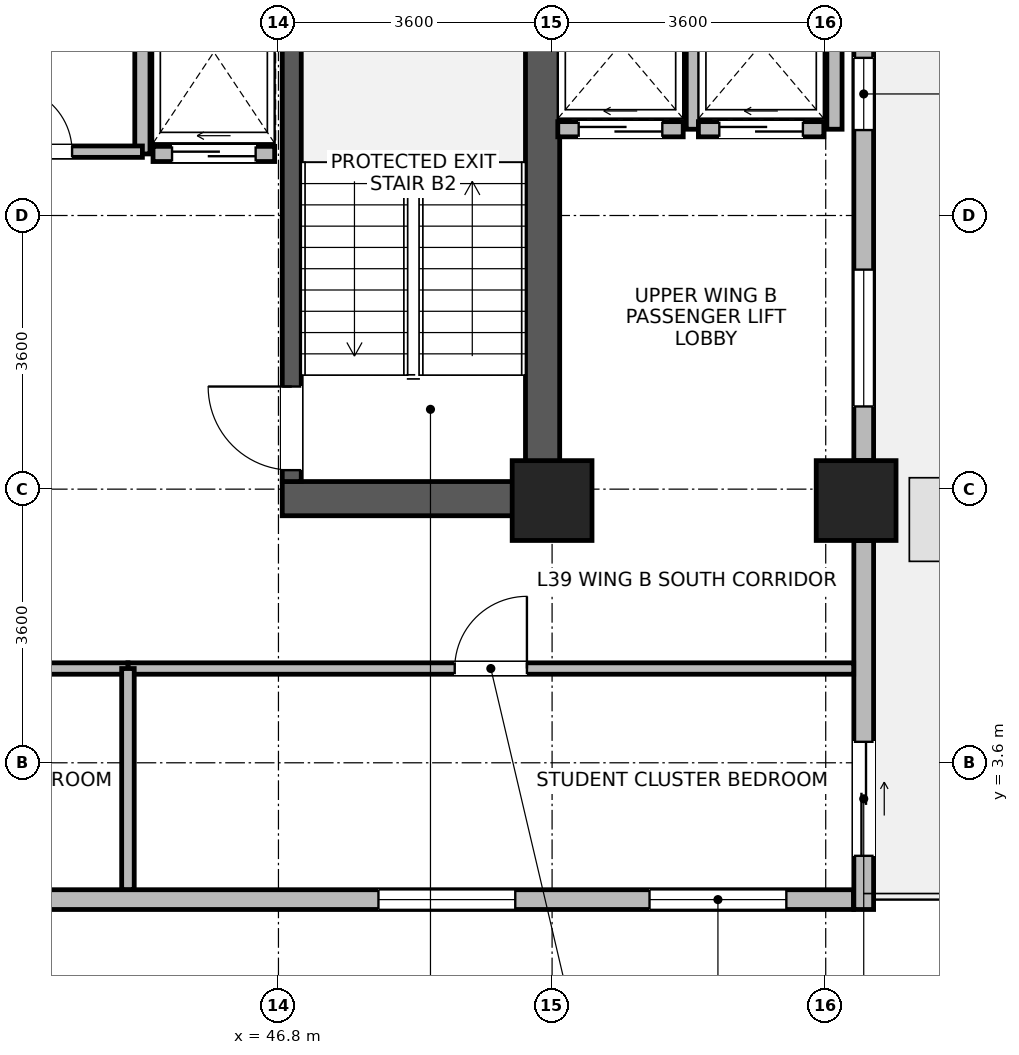
"""IFC4 building model, lengths in metres.
Left out: names, types, materials, properties, quantities, classifications, styles, units other than length and angle.
Written with IfcOpenShell. Run it as: python <this file> out.ifc"""

import sys

from ifc_helpers import new_model, si_unit, direction, frame, frame_2d, origin, origin_2d, place, context, subcontext, project, spatial, rectangle, extrude, source, transform, mapped, element, fill, save


model = new_model("IFC4")
c1 = context("Model", 3, precision=1e-05, world=origin(), true_north=direction((0.0, 1.0)))
c2 = subcontext(c1, "Body", "Model", "MODEL_VIEW")
j1 = project(units=[si_unit("LENGTHUNIT", "METRE"), si_unit("PLANEANGLEUNIT", "RADIAN")], contexts=[c1])
p1 = place(None, origin())
s1 = spatial("IfcSite", under=j1, at=p1, CompositionType="ELEMENT")
p2 = place(p1, origin())
s2 = spatial("IfcBuilding", under=s1, at=p2, CompositionType="ELEMENT")
p3 = place(p2, frame((0.0, 0.0, 155.0)))
s3 = spatial("IfcBuildingStorey", under=s2, at=p3, CompositionType="ELEMENT", Elevation=155.0)
p4 = place(p3, frame((50.275, 6.85, 0.0), z_axis=(0.0, 0.0, 1.0), x_axis=(0.0, 1.0, 0.0)))
e1 = element("IfcWall", 1, at=p4, inside=s3, PredefinedType="SHEAR", context=c2, shape_type="SweptSolid", body=[
    extrude(rectangle(XDim=7.9, YDim=0.45, at=frame_2d((3.95, 0.0))), origin(), (0.0, 0.0, 1.0), 3.46),
])
p5 = place(p3, frame((46.85, 7.075, 0.0), z_axis=(0.0, 0.0, 1.0), x_axis=(1.0, 0.0, 0.0)))
e2 = element("IfcWall", 2, at=p5, inside=s3, PredefinedType="SHEAR", context=c2, shape_type="SweptSolid", body=[
    extrude(rectangle(XDim=3.2, YDim=0.45, at=frame_2d((1.6, 0.0))), origin(), (0.0, 0.0, 1.0), 3.46),
])
p6 = place(p3, frame((46.975, 7.3, 0.0), z_axis=(0.0, 0.0, 1.0), x_axis=(0.0, 1.0, 0.0)))
e3 = element("IfcWall", 3, at=p6, inside=s3, PredefinedType="SHEAR", context=c2, shape_type="SweptSolid", body=[
    extrude(rectangle(XDim=7.0, YDim=0.25, at=frame_2d((3.5, 0.0))), origin(), (0.0, 0.0, 1.0), 3.46),
])
p7 = place(p6, frame((0.15, 0.0, 0.0)))
e4 = element("IfcOpeningElement", 4, at=p7, cuts=e3, PredefinedType="OPENING", context=c2, shape_type="SweptSolid", body=[
    extrude(rectangle(XDim=1.1, YDim=2.08, at=frame_2d((0.55, 1.04))), frame((0.0, 0.135, 0.0), z_axis=(0.0, -1.0, 0.0), x_axis=(1.0, 0.0, 0.0)), (0.0, 0.0, 1.0), 0.27),
])
m1 = source(origin(), c2, "Body", "SweptSolid", [
    extrude(rectangle(XDim=1.05, YDim=1.05, at=origin_2d()), origin(), (0.0, 0.0, 1.0), 3.7),
])
for number, where, z_axis, x_axis in (
    (5, (50.4, 7.05, 0.0), (0.0, 0.0, 1.0), (1.0, 0.0, 0.0)),
    (6, (54.4, 7.05, 0.0), (0.0, 0.0, 1.0), (1.0, 0.0, 0.0)),
):
    element("IfcColumn", number, at=place(p3, frame(where, z_axis=z_axis, x_axis=x_axis)), inside=s3, PredefinedType="COLUMN", context=c2, shape_type="MappedRepresentation", body=[
        mapped(m1, transform((0.0, 0.0, 0.0), x_axis=(1.0, 0.0, 0.0), y_axis=(0.0, 1.0, 0.0), z_axis=(0.0, 0.0, 1.0), scale=1.0)),
    ])
p8 = place(p3, frame((54.365, 1.8, 0.0), z_axis=(0.0, 0.0, 1.0), x_axis=(-1.0, 0.0, 0.0)))
e7 = element("IfcWall", 7, at=p8, inside=s3, PredefinedType="STANDARD", context=c2, shape_type="SweptSolid", body=[
    extrude(rectangle(XDim=28.53, YDim=0.26, at=frame_2d((14.265, 0.0))), origin(), (0.0, 0.0, 1.0), 3.44),
])
p9 = place(p8, frame((0.883, 0.0, 0.85)))
e8 = element("IfcOpeningElement", 8, at=p9, cuts=e7, PredefinedType="OPENING", context=c2, shape_type="SweptSolid", body=[
    extrude(rectangle(XDim=1.8, YDim=1.85, at=frame_2d((0.9, 0.925))), frame((0.0, 0.14, 0.0), z_axis=(0.0, -1.0, 0.0), x_axis=(1.0, 0.0, 0.0)), (0.0, 0.0, 1.0), 0.28),
])
p10 = place(p8, frame((4.449, 0.0, 0.85)))
e9 = element("IfcOpeningElement", 9, at=p10, cuts=e7, PredefinedType="OPENING", context=c2, shape_type="SweptSolid", body=[
    extrude(rectangle(XDim=1.8, YDim=1.85, at=frame_2d((0.9, 0.925))), frame((0.0, 0.14, 0.0), z_axis=(0.0, -1.0, 0.0), x_axis=(1.0, 0.0, 0.0)), (0.0, 0.0, 1.0), 0.28),
])
p11 = place(p8, frame((11.582, 0.0, 0.85)))
e10 = element("IfcOpeningElement", 10, at=p11, cuts=e7, PredefinedType="OPENING", context=c2, shape_type="SweptSolid", body=[
    extrude(rectangle(XDim=1.8, YDim=1.85, at=frame_2d((0.9, 0.925))), frame((0.0, 0.14, 0.0), z_axis=(0.0, -1.0, 0.0), x_axis=(1.0, 0.0, 0.0)), (0.0, 0.0, 1.0), 0.28),
])
p12 = place(p8, frame((15.148, 0.0, 0.85)))
e11 = element("IfcOpeningElement", 11, at=p12, cuts=e7, PredefinedType="OPENING", context=c2, shape_type="SweptSolid", body=[
    extrude(rectangle(XDim=1.8, YDim=1.85, at=frame_2d((0.9, 0.925))), frame((0.0, 0.14, 0.0), z_axis=(0.0, -1.0, 0.0), x_axis=(1.0, 0.0, 0.0)), (0.0, 0.0, 1.0), 0.28),
])
p13 = place(p8, frame((22.281, 0.0, 0.85)))
e12 = element("IfcOpeningElement", 12, at=p13, cuts=e7, PredefinedType="OPENING", context=c2, shape_type="SweptSolid", body=[
    extrude(rectangle(XDim=1.8, YDim=1.85, at=frame_2d((0.9, 0.925))), frame((0.0, 0.14, 0.0), z_axis=(0.0, -1.0, 0.0), x_axis=(1.0, 0.0, 0.0)), (0.0, 0.0, 1.0), 0.28),
])
p14 = place(p8, frame((25.847, 0.0, 0.85)))
e13 = element("IfcOpeningElement", 13, at=p14, cuts=e7, PredefinedType="OPENING", context=c2, shape_type="SweptSolid", body=[
    extrude(rectangle(XDim=1.8, YDim=1.85, at=frame_2d((0.9, 0.925))), frame((0.0, 0.14, 0.0), z_axis=(0.0, -1.0, 0.0), x_axis=(1.0, 0.0, 0.0)), (0.0, 0.0, 1.0), 0.28),
])
p15 = place(p3, frame((54.5, 6.524, 0.0), z_axis=(0.0, 0.0, 1.0), x_axis=(0.0, -1.0, 0.0)))
e14 = element("IfcWall", 14, at=p15, inside=s3, PredefinedType="STANDARD", context=c2, shape_type="SweptSolid", body=[
    extrude(rectangle(XDim=4.854, YDim=0.26, at=frame_2d((2.427, 0.0))), origin(), (0.0, 0.0, 1.0), 3.44),
])
p16 = place(p15, frame((2.648, 0.0, 0.0)))
e15 = element("IfcOpeningElement", 15, at=p16, cuts=e14, PredefinedType="OPENING", context=c2, shape_type="SweptSolid", body=[
    extrude(rectangle(XDim=1.5, YDim=2.15, at=frame_2d((0.75, 1.075))), frame((0.0, 0.14, 0.0), z_axis=(0.0, -1.0, 0.0), x_axis=(1.0, 0.0, 0.0)), (0.0, 0.0, 1.0), 0.28),
])
p17 = place(p3, frame((54.5, 14.024, 0.0), z_axis=(0.0, 0.0, 1.0), x_axis=(0.0, -1.0, 0.0)))
e16 = element("IfcWall", 16, at=p17, inside=s3, PredefinedType="STANDARD", context=c2, shape_type="SweptSolid", body=[
    extrude(rectangle(XDim=6.448, YDim=0.26, at=frame_2d((3.224, 0.0))), origin(), (0.0, 0.0, 1.0), 2.99),
])
p18 = place(p17, frame((3.936, 0.0, 0.85)))
e17 = element("IfcOpeningElement", 17, at=p18, cuts=e16, PredefinedType="OPENING", context=c2, shape_type="SweptSolid", body=[
    extrude(rectangle(XDim=1.8, YDim=1.85, at=frame_2d((0.9, 0.925))), frame((0.0, 0.14, 0.0), z_axis=(0.0, -1.0, 0.0), x_axis=(1.0, 0.0, 0.0)), (0.0, 0.0, 1.0), 0.28),
])
p19 = place(p17, frame((1.15, 0.0, 0.85)))
e18 = element("IfcOpeningElement", 18, at=p19, cuts=e16, PredefinedType="OPENING", context=c2, shape_type="SweptSolid", body=[
    extrude(rectangle(XDim=0.95, YDim=1.75, at=frame_2d((0.475, 0.875))), frame((0.0, 0.14, 0.0), z_axis=(0.0, -1.0, 0.0), x_axis=(1.0, 0.0, 0.0)), (0.0, 0.0, 1.0), 0.28),
])
p20 = place(p3, frame((50.475, 11.935, 0.0), z_axis=(0.0, 0.0, 1.0), x_axis=(1.0, 0.0, 0.0)))
e19 = element("IfcWall", 19, at=p20, inside=s3, PredefinedType="PARTITIONING", context=c2, shape_type="SweptSolid", body=[
    extrude(rectangle(XDim=1.65, YDim=0.2, at=frame_2d((0.825, 0.0))), origin(), (0.0, 0.0, 1.0), 3.44),
])
p21 = place(p20, frame((0.275, 0.0, 0.0)))
e20 = element("IfcOpeningElement", 20, at=p21, cuts=e19, PredefinedType="OPENING", context=c2, shape_type="SweptSolid", body=[
    extrude(rectangle(XDim=1.1, YDim=2.12, at=frame_2d((0.55, 1.06))), frame((0.0, 0.11, 0.0), z_axis=(0.0, -1.0, 0.0), x_axis=(1.0, 0.0, 0.0)), (0.0, 0.0, 1.0), 0.22),
])
p22 = place(p3, frame((52.265, 11.935, 0.0), z_axis=(0.0, 0.0, 1.0), x_axis=(0.0, 1.0, 0.0)))
e21 = element("IfcWall", 21, at=p22, inside=s3, PredefinedType="PARTITIONING", context=c2, shape_type="SweptSolid", body=[
    extrude(rectangle(XDim=2.23, YDim=0.2, at=frame_2d((1.115, 0.0))), origin(), (0.0, 0.0, 1.0), 3.44),
])
p23 = place(p3, frame((52.325, 11.935, 0.0), z_axis=(0.0, 0.0, 1.0), x_axis=(1.0, 0.0, 0.0)))
e22 = element("IfcWall", 22, at=p23, inside=s3, PredefinedType="PARTITIONING", context=c2, shape_type="SweptSolid", body=[
    extrude(rectangle(XDim=1.65, YDim=0.2, at=frame_2d((0.825, 0.0))), origin(), (0.0, 0.0, 1.0), 3.44),
])
p24 = place(p23, frame((0.275, 0.0, 0.0)))
e23 = element("IfcOpeningElement", 23, at=p24, cuts=e22, PredefinedType="OPENING", context=c2, shape_type="SweptSolid", body=[
    extrude(rectangle(XDim=1.1, YDim=2.12, at=frame_2d((0.55, 1.06))), frame((0.0, 0.11, 0.0), z_axis=(0.0, -1.0, 0.0), x_axis=(1.0, 0.0, 0.0)), (0.0, 0.0, 1.0), 0.22),
])
p25 = place(p3, frame((54.115, 11.935, 0.0), z_axis=(0.0, 0.0, 1.0), x_axis=(0.0, 1.0, 0.0)))
e24 = element("IfcWall", 24, at=p25, inside=s3, PredefinedType="PARTITIONING", context=c2, shape_type="SweptSolid", body=[
    extrude(rectangle(XDim=2.23, YDim=0.2, at=frame_2d((1.115, 0.0))), origin(), (0.0, 0.0, 1.0), 2.99),
])
p26 = place(p3, frame((45.15, 11.61, 0.0), z_axis=(0.0, 0.0, 1.0), x_axis=(1.0, 0.0, 0.0)))
e25 = element("IfcWall", 25, at=p26, inside=s3, PredefinedType="PARTITIONING", context=c2, shape_type="SweptSolid", body=[
    extrude(rectangle(XDim=1.6, YDim=0.2, at=frame_2d((0.8, 0.0))), origin(), (0.0, 0.0, 1.0), 3.44),
])
p27 = place(p26, frame((0.25, 0.0, 0.0)))
e26 = element("IfcOpeningElement", 26, at=p27, cuts=e25, PredefinedType="OPENING", context=c2, shape_type="SweptSolid", body=[
    extrude(rectangle(XDim=1.1, YDim=2.12, at=frame_2d((0.55, 1.06))), frame((0.0, 0.11, 0.0), z_axis=(0.0, -1.0, 0.0), x_axis=(1.0, 0.0, 0.0)), (0.0, 0.0, 1.0), 0.22),
])
p28 = place(p3, frame((45.01, 11.61, 0.0), z_axis=(0.0, 0.0, 1.0), x_axis=(0.0, 1.0, 0.0)))
e27 = element("IfcWall", 27, at=p28, inside=s3, PredefinedType="PARTITIONING", context=c2, shape_type="SweptSolid", body=[
    extrude(rectangle(XDim=2.68, YDim=0.2, at=frame_2d((1.34, 0.0))), origin(), (0.0, 0.0, 1.0), 3.44),
])
p29 = place(p3, frame((44.82, 4.84, 0.0), z_axis=(0.0, 0.0, 1.0), x_axis=(1.0, 0.0, 0.0)))
e28 = element("IfcWall", 28, at=p29, inside=s3, PredefinedType="PARTITIONING", context=c2, shape_type="SweptSolid", body=[
    extrude(rectangle(XDim=9.548, YDim=0.15, at=frame_2d((4.774, 0.0))), origin(), (0.0, 0.0, 1.0), 3.44),
])
p30 = place(p29, frame((4.299, 0.0, 0.0)))
e29 = element("IfcOpeningElement", 29, at=p30, cuts=e28, PredefinedType="OPENING", context=c2, shape_type="SweptSolid", body=[
    extrude(rectangle(XDim=0.95, YDim=2.1, at=frame_2d((0.475, 1.05))), frame((0.0, 0.085, 0.0), z_axis=(0.0, -1.0, 0.0), x_axis=(1.0, 0.0, 0.0)), (0.0, 0.0, 1.0), 0.17),
])
p31 = place(p3, frame((35.64, 4.84, 0.0), z_axis=(0.0, 0.0, 1.0), x_axis=(1.0, 0.0, 0.0)))
e30 = element("IfcWall", 30, at=p31, inside=s3, PredefinedType="PARTITIONING", context=c2, shape_type="SweptSolid", body=[
    extrude(rectangle(XDim=9.18, YDim=0.15, at=frame_2d((4.59, 0.0))), origin(), (0.0, 0.0, 1.0), 3.44),
])
p32 = place(p31, frame((4.115, 0.0, 0.0)))
e31 = element("IfcOpeningElement", 31, at=p32, cuts=e30, PredefinedType="OPENING", context=c2, shape_type="SweptSolid", body=[
    extrude(rectangle(XDim=0.95, YDim=2.1, at=frame_2d((0.475, 1.05))), frame((0.0, 0.085, 0.0), z_axis=(0.0, -1.0, 0.0), x_axis=(1.0, 0.0, 0.0)), (0.0, 0.0, 1.0), 0.17),
])
p33 = place(p3, frame((42.3, 11.64, 0.0), z_axis=(0.0, 0.0, 1.0), x_axis=(1.0, 0.0, 0.0)))
e32 = element("IfcWall", 32, at=p33, inside=s3, PredefinedType="PARTITIONING", context=c2, shape_type="SweptSolid", body=[
    extrude(rectangle(XDim=2.71, YDim=0.15, at=frame_2d((1.355, 0.0))), origin(), (0.0, 0.0, 1.0), 3.44),
])
p34 = place(p33, frame((0.925, 0.0, 0.0)))
e33 = element("IfcOpeningElement", 33, at=p34, cuts=e32, PredefinedType="OPENING", context=c2, shape_type="SweptSolid", body=[
    extrude(rectangle(XDim=0.86, YDim=2.02, at=frame_2d((0.43, 1.01))), frame((0.0, 0.085, 0.0), z_axis=(0.0, -1.0, 0.0), x_axis=(1.0, 0.0, 0.0)), (0.0, 0.0, 1.0), 0.17),
])
p35 = place(p3, frame((44.82, 1.932, 0.0), z_axis=(0.0, 0.0, 1.0), x_axis=(0.0, 1.0, 0.0)))
e34 = element("IfcWall", 34, at=p35, inside=s3, PredefinedType="PARTITIONING", context=c2, shape_type="SweptSolid", body=[
    extrude(rectangle(XDim=2.908, YDim=0.165, at=frame_2d((1.454, 0.0))), origin(), (0.0, 0.0, 1.0), 3.44),
])
p36 = place(p9, origin())
e35 = element("IfcWindow", 35, at=p36, inside=s3, PartitioningType="SINGLE_PANEL", PredefinedType="WINDOW", context=c2, shape_type="SweptSolid", body=[
    extrude(rectangle(XDim=1.8, YDim=1.85, at=frame_2d((0.9, 0.925))), frame((0.0, 0.03, 0.0), z_axis=(0.0, -1.0, 0.0), x_axis=(1.0, 0.0, 0.0)), (0.0, 0.0, 1.0), 0.06),
])
fill(e8, e35)
p37 = place(p10, origin())
e36 = element("IfcWindow", 36, at=p37, inside=s3, PartitioningType="SINGLE_PANEL", PredefinedType="WINDOW", context=c2, shape_type="SweptSolid", body=[
    extrude(rectangle(XDim=1.8, YDim=1.85, at=frame_2d((0.9, 0.925))), frame((0.0, 0.03, 0.0), z_axis=(0.0, -1.0, 0.0), x_axis=(1.0, 0.0, 0.0)), (0.0, 0.0, 1.0), 0.06),
])
fill(e9, e36)
p38 = place(p16, origin())
e37 = element("IfcDoor", 37, at=p38, inside=s3, OperationType="SLIDING_TO_LEFT", PredefinedType="DOOR", context=c2, shape_type="SweptSolid", body=[
    extrude(rectangle(XDim=1.5, YDim=2.15, at=frame_2d((0.75, 1.075))), frame((0.0, 0.025, 0.0), z_axis=(0.0, -1.0, 0.0), x_axis=(1.0, 0.0, 0.0)), (0.0, 0.0, 1.0), 0.05),
])
fill(e15, e37)
p39 = place(p18, origin())
e38 = element("IfcWindow", 38, at=p39, inside=s3, PartitioningType="SINGLE_PANEL", PredefinedType="WINDOW", context=c2, shape_type="SweptSolid", body=[
    extrude(rectangle(XDim=1.8, YDim=1.85, at=frame_2d((0.9, 0.925))), frame((0.0, 0.03, 0.0), z_axis=(0.0, -1.0, 0.0), x_axis=(1.0, 0.0, 0.0)), (0.0, 0.0, 1.0), 0.06),
])
fill(e17, e38)
p40 = place(p19, origin())
e39 = element("IfcWindow", 39, at=p40, inside=s3, PartitioningType="SINGLE_PANEL", PredefinedType="WINDOW", context=c2, shape_type="SweptSolid", body=[
    extrude(rectangle(XDim=0.95, YDim=1.75, at=frame_2d((0.475, 0.875))), frame((0.0, 0.03, 0.0), z_axis=(0.0, -1.0, 0.0), x_axis=(1.0, 0.0, 0.0)), (0.0, 0.0, 1.0), 0.06),
])
fill(e18, e39)
p41 = place(p7, origin())
e40 = element("IfcDoor", 40, at=p41, inside=s3, OperationType="SINGLE_SWING_RIGHT", PredefinedType="DOOR", context=c2, shape_type="SweptSolid", body=[
    extrude(rectangle(XDim=1.1, YDim=2.08, at=frame_2d((0.55, 1.04))), frame((0.0, 0.025, 0.0), z_axis=(0.0, -1.0, 0.0), x_axis=(1.0, 0.0, 0.0)), (0.0, 0.0, 1.0), 0.05),
])
fill(e4, e40)
p42 = place(p21, origin())
e41 = element("IfcDoor", 41, at=p42, inside=s3, OperationType="SLIDING_TO_LEFT", PredefinedType="DOOR", context=c2, shape_type="SweptSolid", body=[
    extrude(rectangle(XDim=1.1, YDim=2.12, at=frame_2d((0.55, 1.06))), frame((0.0, 0.025, 0.0), z_axis=(0.0, -1.0, 0.0), x_axis=(1.0, 0.0, 0.0)), (0.0, 0.0, 1.0), 0.05),
])
fill(e20, e41)
p43 = place(p24, origin())
e42 = element("IfcDoor", 42, at=p43, inside=s3, OperationType="SLIDING_TO_LEFT", PredefinedType="DOOR", context=c2, shape_type="SweptSolid", body=[
    extrude(rectangle(XDim=1.1, YDim=2.12, at=frame_2d((0.55, 1.06))), frame((0.0, 0.025, 0.0), z_axis=(0.0, -1.0, 0.0), x_axis=(1.0, 0.0, 0.0)), (0.0, 0.0, 1.0), 0.05),
])
fill(e23, e42)
p44 = place(p27, origin())
e43 = element("IfcDoor", 43, at=p44, inside=s3, OperationType="SLIDING_TO_LEFT", PredefinedType="DOOR", context=c2, shape_type="SweptSolid", body=[
    extrude(rectangle(XDim=1.1, YDim=2.12, at=frame_2d((0.55, 1.06))), frame((0.0, 0.025, 0.0), z_axis=(0.0, -1.0, 0.0), x_axis=(1.0, 0.0, 0.0)), (0.0, 0.0, 1.0), 0.05),
])
fill(e26, e43)
p45 = place(p30, origin())
e44 = element("IfcDoor", 44, at=p45, inside=s3, OperationType="SINGLE_SWING_RIGHT", PredefinedType="DOOR", context=c2, shape_type="SweptSolid", body=[
    extrude(rectangle(XDim=0.95, YDim=2.1, at=frame_2d((0.475, 1.05))), frame((0.0, 0.025, 0.0), z_axis=(0.0, -1.0, 0.0), x_axis=(1.0, 0.0, 0.0)), (0.0, 0.0, 1.0), 0.05),
])
fill(e29, e44)
p46 = place(p34, origin())
e45 = element("IfcDoor", 45, at=p46, inside=s3, OperationType="SINGLE_SWING_LEFT", PredefinedType="DOOR", context=c2, shape_type="SweptSolid", body=[
    extrude(rectangle(XDim=0.86, YDim=2.02, at=frame_2d((0.43, 1.01))), frame((0.0, 0.025, 0.0), z_axis=(0.0, -1.0, 0.0), x_axis=(1.0, 0.0, 0.0)), (0.0, 0.0, 1.0), 0.05),
])
fill(e33, e45)
save(model, sys.argv[1])
